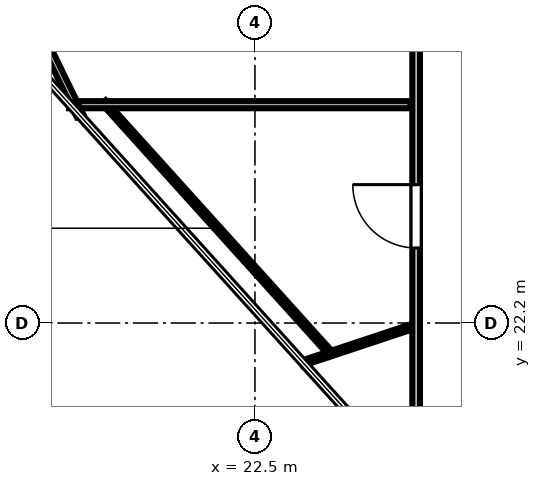
"""IFC4 building model, lengths in metres.
Left out: names, types, materials, properties, quantities, classifications, styles, units other than length and angle.
Written with IfcOpenShell. Run it as: python <this file> out.ifc"""

import sys

from ifc_helpers import new_model, si_unit, direction, frame, frame_2d, origin, place, context, subcontext, project, spatial, rectangle, extrude, element, fill, save


model = new_model("IFC4")
c1 = context("Model", 3, precision=1e-05, world=origin(), true_north=direction((0.0, 1.0)))
c2 = subcontext(c1, "Body", "Model", "MODEL_VIEW")
j1 = project(units=[si_unit("LENGTHUNIT", "METRE"), si_unit("PLANEANGLEUNIT", "RADIAN")], contexts=[c1])
p1 = place(None, origin())
s1 = spatial("IfcSite", under=j1, at=p1, CompositionType="ELEMENT")
p2 = place(p1, origin())
s2 = spatial("IfcBuilding", under=s1, at=p2, CompositionType="ELEMENT")
p3 = place(p2, frame((0.0, 0.0, 329.6)))
s3 = spatial("IfcBuildingStorey", under=s2, at=p3, CompositionType="ELEMENT", Elevation=329.6)
p4 = place(p3, frame((19.164, 31.119, 0.0), z_axis=(0.0, 0.0, 1.0), x_axis=(-0.284624412262, -0.958639110377, 0.0)))
e1 = element("IfcWall", 1, at=p4, inside=s3, PredefinedType="SOLIDWALL", context=c2, shape_type="SweptSolid", body=[
    extrude(rectangle(XDim=3.892, YDim=0.26, at=frame_2d((1.946, 0.0))), origin(), (0.0, 0.0, 1.0), 3.52),
])
p5 = place(p4, frame((1.046, 0.0, 0.85)))
e2 = element("IfcOpeningElement", 2, at=p5, cuts=e1, PredefinedType="OPENING", context=c2, shape_type="SweptSolid", body=[
    extrude(rectangle(XDim=1.8, YDim=2.1, at=frame_2d((0.9, 1.05))), frame((0.0, 0.14, 0.0), z_axis=(0.0, -1.0, 0.0), x_axis=(1.0, 0.0, 0.0)), (0.0, 0.0, 1.0), 0.28),
])
p6 = place(p3, frame((25.681, 19.718, 0.0), z_axis=(0.0, 0.0, 1.0), x_axis=(0.0, 1.0, 0.0)))
e3 = element("IfcWall", 3, at=p6, inside=s3, PredefinedType="PARTITIONING", context=c2, shape_type="SweptSolid", body=[
    extrude(rectangle(XDim=12.832, YDim=0.15, at=frame_2d((6.416, 0.0))), origin(), (0.0, 0.0, 1.0), 2.84),
])
p7 = place(p6, frame((3.963, 0.0, 0.0)))
e4 = element("IfcOpeningElement", 4, at=p7, cuts=e3, PredefinedType="OPENING", context=c2, shape_type="SweptSolid", body=[
    extrude(rectangle(XDim=1.25, YDim=2.2, at=frame_2d((0.625, 1.1))), frame((0.0, 0.085, 0.0), z_axis=(0.0, -1.0, 0.0), x_axis=(1.0, 0.0, 0.0)), (0.0, 0.0, 1.0), 0.17),
])
p8 = place(p3, frame((24.01, 21.581, 0.0), z_axis=(0.0, 0.0, 1.0), x_axis=(-0.670184116522, 0.742194886779, 0.0)))
e5 = element("IfcWall", 5, at=p8, inside=s3, PredefinedType="PARTITIONING", context=c2, shape_type="SweptSolid", body=[
    extrude(rectangle(XDim=6.709, YDim=0.105, at=frame_2d((3.355, 0.0))), origin(), (0.0, 0.0, 1.0), 2.84),
])
p9 = place(p3, frame((18.831, 26.509, 0.0), z_axis=(0.0, 0.0, 1.0), x_axis=(1.0, 0.0, 0.0)))
e6 = element("IfcWall", 6, at=p9, inside=s3, PredefinedType="PARTITIONING", context=c2, shape_type="SweptSolid", body=[
    extrude(rectangle(XDim=6.739, YDim=0.14, at=frame_2d((3.369, 0.0))), origin(), (0.0, 0.0, 1.0), 2.84),
])
p10 = place(p3, frame((25.56, 22.115, 0.0), z_axis=(0.0, 0.0, 1.0), x_axis=(-0.949107026272, -0.314953731017, 0.0)))
e7 = element("IfcWall", 7, at=p10, inside=s3, PredefinedType="PARTITIONING", context=c2, shape_type="SweptSolid", body=[
    extrude(rectangle(XDim=2.242, YDim=0.105, at=frame_2d((1.121, 0.0))), origin(), (0.0, 0.0, 1.0), 2.84),
])
p11 = place(p3, frame((19.047, 26.292, 0.0), z_axis=(0.0, 0.0, 1.0), x_axis=(-0.437592550732, 0.899173375687, 0.0)))
e8 = element("IfcWall", 8, at=p11, inside=s3, PredefinedType="PARTITIONING", context=c2, shape_type="SweptSolid", body=[
    extrude(rectangle(XDim=1.893, YDim=0.14, at=frame_2d((0.947, 0.0))), origin(), (0.0, 0.0, 1.0), 2.84),
])
p12 = place(p7, origin())
e9 = element("IfcDoor", 9, at=p12, inside=s3, OperationType="SINGLE_SWING_RIGHT", PredefinedType="DOOR", context=c2, shape_type="SweptSolid", body=[
    extrude(rectangle(XDim=1.25, YDim=2.2, at=frame_2d((0.625, 1.1))), frame((0.0, 0.025, 0.0), z_axis=(0.0, -1.0, 0.0), x_axis=(1.0, 0.0, 0.0)), (0.0, 0.0, 1.0), 0.05),
])
fill(e4, e9)
save(model, sys.argv[1])
